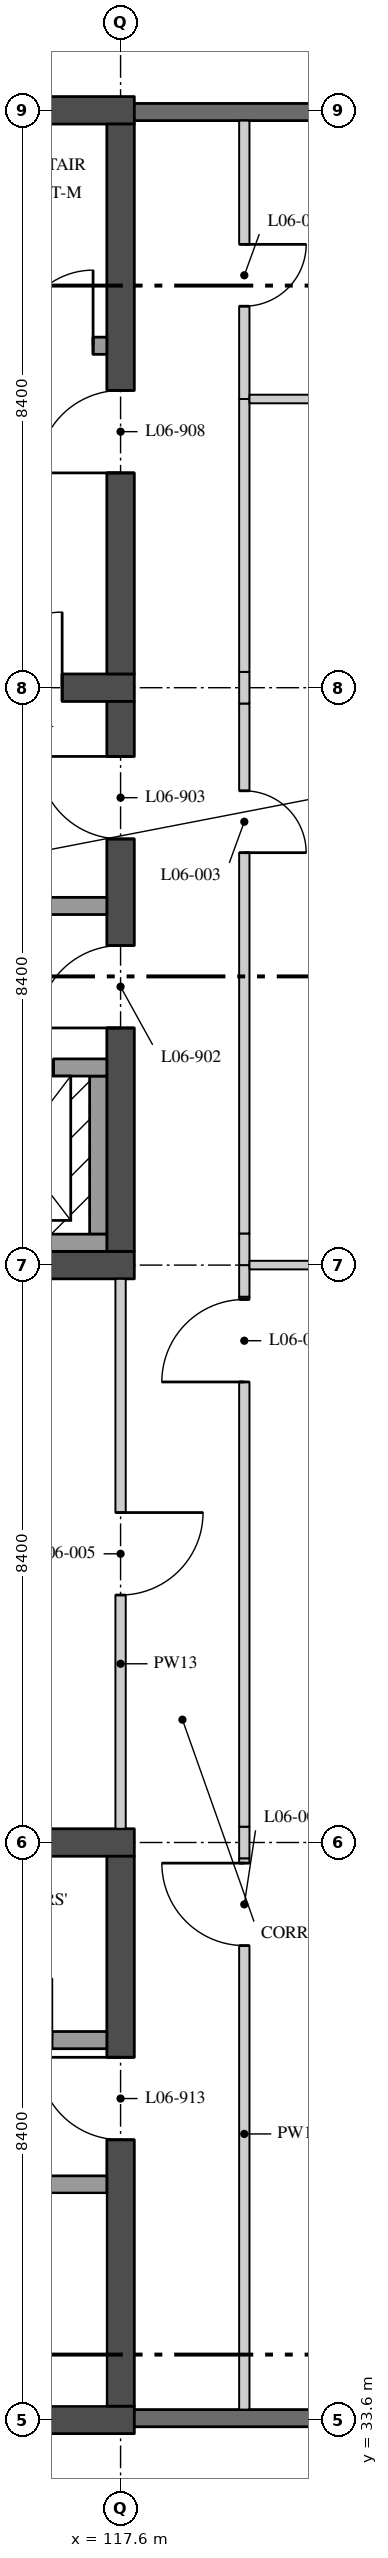
"""IFC4 building model, lengths in metres.
Left out: names, types, materials, properties, quantities, classifications, styles, units other than length and angle.
Written with IfcOpenShell. Run it as: python <this file> out.ifc"""

import sys

from ifc_helpers import new_model, si_unit, direction, frame, frame_2d, origin, place, context, subcontext, project, spatial, rectangle, extrude, element, fill, save


model = new_model("IFC4")
c1 = context("Model", 3, precision=1e-05, world=origin(), true_north=direction((0.0, 1.0)))
c2 = subcontext(c1, "Body", "Model", "MODEL_VIEW")
j1 = project(units=[si_unit("LENGTHUNIT", "METRE"), si_unit("PLANEANGLEUNIT", "RADIAN")], contexts=[c1])
p1 = place(None, origin())
s1 = spatial("IfcSite", under=j1, at=p1, CompositionType="ELEMENT")
p2 = place(p1, origin())
s2 = spatial("IfcBuilding", under=s1, at=p2, CompositionType="ELEMENT")
p3 = place(p2, frame((0.0, 0.0, 27.9)))
s3 = spatial("IfcBuildingStorey", under=s2, at=p3, CompositionType="ELEMENT", Elevation=27.9)
p4 = place(p3, frame((109.0, 50.4, 0.0), z_axis=(0.0, 0.0, 1.0), x_axis=(1.0, 0.0, 0.0)))
e1 = element("IfcWall", 1, at=p4, inside=s3, PredefinedType="SHEAR", context=c2, shape_type="SweptSolid", body=[
    extrude(rectangle(XDim=8.8, YDim=0.4, at=frame_2d((4.4, 0.0))), origin(), (0.0, 0.0, 1.0), 4.37),
])
p5 = place(p3, frame((109.0, 58.8, 0.0), z_axis=(0.0, 0.0, 1.0), x_axis=(1.0, 0.0, 0.0)))
e2 = element("IfcWall", 2, at=p5, inside=s3, PredefinedType="SHEAR", context=c2, shape_type="SweptSolid", body=[
    extrude(rectangle(XDim=8.8, YDim=0.4, at=frame_2d((4.4, 0.0))), origin(), (0.0, 0.0, 1.0), 4.37),
])
p6 = place(p5, frame((6.65, 0.0, 0.0)))
e3 = element("IfcOpeningElement", 3, at=p6, cuts=e2, PredefinedType="OPENING", context=c2, shape_type="SweptSolid", body=[
    extrude(rectangle(XDim=1.1, YDim=2.1, at=frame_2d((0.55, 1.05))), frame((0.0, 0.21, 0.0), z_axis=(0.0, -1.0, 0.0), x_axis=(1.0, 0.0, 0.0)), (0.0, 0.0, 1.0), 0.42),
])
p7 = place(p3, frame((117.6, 50.6, 0.0), z_axis=(0.0, 0.0, 1.0), x_axis=(0.0, 1.0, 0.0)))
e4 = element("IfcWall", 4, at=p7, inside=s3, PredefinedType="SHEAR", context=c2, shape_type="SweptSolid", body=[
    extrude(rectangle(XDim=8.0, YDim=0.4, at=frame_2d((4.0, 0.0))), origin(), (0.0, 0.0, 1.0), 4.37),
])
p8 = place(p7, frame((3.25, 0.0, 0.0)))
e5 = element("IfcOpeningElement", 5, at=p8, cuts=e4, PredefinedType="OPENING", context=c2, shape_type="SweptSolid", body=[
    extrude(rectangle(XDim=1.2, YDim=2.1, at=frame_2d((0.6, 1.05))), frame((0.0, 0.21, 0.0), z_axis=(0.0, -1.0, 0.0), x_axis=(1.0, 0.0, 0.0)), (0.0, 0.0, 1.0), 0.42),
])
p9 = place(p7, frame((6.0, 0.0, 0.0)))
e6 = element("IfcOpeningElement", 6, at=p9, cuts=e4, PredefinedType="OPENING", context=c2, shape_type="SweptSolid", body=[
    extrude(rectangle(XDim=1.2, YDim=2.1, at=frame_2d((0.6, 1.05))), frame((0.0, 0.21, 0.0), z_axis=(0.0, -1.0, 0.0), x_axis=(1.0, 0.0, 0.0)), (0.0, 0.0, 1.0), 0.42),
])
p10 = place(p3, frame((114.75, 55.625, 0.0), z_axis=(0.0, 0.0, 1.0), x_axis=(1.0, 0.0, 0.0)))
e7 = element("IfcWall", 7, at=p10, inside=s3, PredefinedType="SOLIDWALL", context=c2, shape_type="SweptSolid", body=[
    extrude(rectangle(XDim=2.65, YDim=0.25, at=frame_2d((1.325, 0.0))), origin(), (0.0, 0.0, 1.0), 4.37),
])
p11 = place(p3, frame((109.0, 67.2, 0.0), z_axis=(0.0, 0.0, 1.0), x_axis=(1.0, 0.0, 0.0)))
e8 = element("IfcWall", 8, at=p11, inside=s3, PredefinedType="SHEAR", context=c2, shape_type="SweptSolid", body=[
    extrude(rectangle(XDim=8.8, YDim=0.4, at=frame_2d((4.4, 0.0))), origin(), (0.0, 0.0, 1.0), 4.37),
])
p12 = place(p3, frame((117.6, 59.0, 0.0), z_axis=(0.0, 0.0, 1.0), x_axis=(0.0, 1.0, 0.0)))
e9 = element("IfcWall", 9, at=p12, inside=s3, PredefinedType="SHEAR", context=c2, shape_type="SweptSolid", body=[
    extrude(rectangle(XDim=8.0, YDim=0.4, at=frame_2d((4.0, 0.0))), origin(), (0.0, 0.0, 1.0), 4.37),
])
p13 = place(p12, frame((2.925, 0.0, 0.0)))
e10 = element("IfcOpeningElement", 10, at=p13, cuts=e9, PredefinedType="OPENING", context=c2, shape_type="SweptSolid", body=[
    extrude(rectangle(XDim=1.2, YDim=2.1, at=frame_2d((0.6, 1.05))), frame((0.0, 0.21, 0.0), z_axis=(0.0, -1.0, 0.0), x_axis=(1.0, 0.0, 0.0)), (0.0, 0.0, 1.0), 0.42),
])
p14 = place(p3, frame((117.4, 63.775, 0.0), z_axis=(0.0, 0.0, 1.0), x_axis=(-1.0, 0.0, 0.0)))
e11 = element("IfcWall", 11, at=p14, inside=s3, PredefinedType="SOLIDWALL", context=c2, shape_type="SweptSolid", body=[
    extrude(rectangle(XDim=8.0, YDim=0.25, at=frame_2d((4.0, 0.0))), origin(), (0.0, 0.0, 1.0), 4.37),
])
p15 = place(p14, frame((0.2, 0.0, 0.0)))
e12 = element("IfcOpeningElement", 12, at=p15, cuts=e11, PredefinedType="OPENING", context=c2, shape_type="SweptSolid", body=[
    extrude(rectangle(XDim=1.1, YDim=2.1, at=frame_2d((0.55, 1.05))), frame((0.0, 0.135, 0.0), z_axis=(0.0, -1.0, 0.0), x_axis=(1.0, 0.0, 0.0)), (0.0, 0.0, 1.0), 0.27),
])
for number, where, z_axis, x_axis in (
    (13, (109.0, 33.6, 0.0), (0.0, 0.0, 1.0), (1.0, 0.0, 0.0)),
    (14, (109.0, 42.0, 0.0), (0.0, 0.0, 1.0), (1.0, 0.0, 0.0)),
):
    element("IfcWall", number, at=place(p3, frame(where, z_axis=z_axis, x_axis=x_axis)), inside=s3, PredefinedType="SHEAR", context=c2, shape_type="SweptSolid", body=[
        extrude(rectangle(XDim=8.8, YDim=0.4, at=frame_2d((4.4, 0.0))), origin(), (0.0, 0.0, 1.0), 4.37),
    ])
p16 = place(p3, frame((117.6, 33.8, 0.0), z_axis=(0.0, 0.0, 1.0), x_axis=(0.0, 1.0, 0.0)))
e15 = element("IfcWall", 15, at=p16, inside=s3, PredefinedType="SHEAR", context=c2, shape_type="SweptSolid", body=[
    extrude(rectangle(XDim=8.0, YDim=0.4, at=frame_2d((4.0, 0.0))), origin(), (0.0, 0.0, 1.0), 4.37),
])
p17 = place(p16, frame((3.875, 0.0, 0.0)))
e16 = element("IfcOpeningElement", 16, at=p17, cuts=e15, PredefinedType="OPENING", context=c2, shape_type="SweptSolid", body=[
    extrude(rectangle(XDim=1.2, YDim=2.1, at=frame_2d((0.6, 1.05))), frame((0.0, 0.21, 0.0), z_axis=(0.0, -1.0, 0.0), x_axis=(1.0, 0.0, 0.0)), (0.0, 0.0, 1.0), 0.42),
])
p18 = place(p3, frame((109.4, 37.025, 0.0), z_axis=(0.0, 0.0, 1.0), x_axis=(1.0, 0.0, 0.0)))
e17 = element("IfcWall", 17, at=p18, inside=s3, PredefinedType="SOLIDWALL", context=c2, shape_type="SweptSolid", body=[
    extrude(rectangle(XDim=8.0, YDim=0.25, at=frame_2d((4.0, 0.0))), origin(), (0.0, 0.0, 1.0), 4.37),
])
p19 = place(p18, frame((0.2, 0.0, 0.0)))
e18 = element("IfcOpeningElement", 18, at=p19, cuts=e17, PredefinedType="OPENING", context=c2, shape_type="SweptSolid", body=[
    extrude(rectangle(XDim=1.1, YDim=2.1, at=frame_2d((0.55, 1.05))), frame((0.0, 0.135, 0.0), z_axis=(0.0, -1.0, 0.0), x_axis=(1.0, 0.0, 0.0)), (0.0, 0.0, 1.0), 0.27),
])
p20 = place(p3, frame((112.05, 39.125, 0.0), z_axis=(0.0, 0.0, 1.0), x_axis=(1.0, 0.0, 0.0)))
e19 = element("IfcWall", 19, at=p20, inside=s3, PredefinedType="SOLIDWALL", context=c2, shape_type="SweptSolid", body=[
    extrude(rectangle(XDim=5.35, YDim=0.25, at=frame_2d((2.675, 0.0))), origin(), (0.0, 0.0, 1.0), 4.37),
])
p21 = place(p20, frame((3.65, 0.0, 0.0)))
e20 = element("IfcOpeningElement", 20, at=p21, cuts=e19, PredefinedType="OPENING", context=c2, shape_type="SweptSolid", body=[
    extrude(rectangle(XDim=0.9, YDim=2.1, at=frame_2d((0.45, 1.05))), frame((0.0, 0.135, 0.0), z_axis=(0.0, -1.0, 0.0), x_axis=(1.0, 0.0, 0.0)), (0.0, 0.0, 1.0), 0.27),
])
p22 = place(p20, frame((0.9, 0.0, 0.0)))
e21 = element("IfcOpeningElement", 21, at=p22, cuts=e19, PredefinedType="OPENING", context=c2, shape_type="SweptSolid", body=[
    extrude(rectangle(XDim=0.8, YDim=2.1, at=frame_2d((0.4, 1.05))), frame((0.0, 0.135, 0.0), z_axis=(0.0, -1.0, 0.0), x_axis=(1.0, 0.0, 0.0)), (0.0, 0.0, 1.0), 0.27),
])
p23 = place(p3, frame((117.275, 50.85, 0.0), z_axis=(0.0, 0.0, 1.0), x_axis=(0.0, 1.0, 0.0)))
e22 = element("IfcWall", 22, at=p23, inside=s3, PredefinedType="SOLIDWALL", context=c2, shape_type="SweptSolid", body=[
    extrude(rectangle(XDim=2.3, YDim=0.25, at=frame_2d((1.15, 0.0))), origin(), (0.0, 0.0, 1.0), 4.37),
])
p24 = place(p3, frame((114.75, 53.275, 0.0), z_axis=(0.0, 0.0, 1.0), x_axis=(1.0, 0.0, 0.0)))
e23 = element("IfcWall", 23, at=p24, inside=s3, PredefinedType="SOLIDWALL", context=c2, shape_type="SweptSolid", body=[
    extrude(rectangle(XDim=2.65, YDim=0.25, at=frame_2d((1.325, 0.0))), origin(), (0.0, 0.0, 1.0), 4.37),
])
p25 = place(p24, frame((0.775, 0.0, 0.0)))
e24 = element("IfcOpeningElement", 24, at=p25, cuts=e23, PredefinedType="OPENING", context=c2, shape_type="SweptSolid", body=[
    extrude(rectangle(XDim=1.1, YDim=2.1, at=frame_2d((0.55, 1.05))), frame((0.0, 0.135, 0.0), z_axis=(0.0, -1.0, 0.0), x_axis=(1.0, 0.0, 0.0)), (0.0, 0.0, 1.0), 0.27),
])
p26 = place(p3, frame((114.75, 50.725, 0.0), z_axis=(0.0, 0.0, 1.0), x_axis=(1.0, 0.0, 0.0)))
e25 = element("IfcWall", 25, at=p26, inside=s3, PredefinedType="SOLIDWALL", context=c2, shape_type="SweptSolid", body=[
    extrude(rectangle(XDim=2.65, YDim=0.25, at=frame_2d((1.325, 0.0))), origin(), (0.0, 0.0, 1.0), 4.37),
])
p27 = place(p3, frame((119.4, 33.75, 0.0), z_axis=(0.0, 0.0, 1.0), x_axis=(0.0, 1.0, 0.0)))
e26 = element("IfcWall", 26, at=p27, inside=s3, PredefinedType="PARTITIONING", context=c2, shape_type="SweptSolid", body=[
    extrude(rectangle(XDim=8.02, YDim=0.15, at=frame_2d((4.01, 0.0))), origin(), (0.0, 0.0, 1.0), 4.37),
])
p28 = place(p27, frame((6.75, 0.0, 0.0)))
e27 = element("IfcOpeningElement", 27, at=p28, cuts=e26, PredefinedType="OPENING", context=c2, shape_type="SweptSolid", body=[
    extrude(rectangle(XDim=1.2, YDim=2.4, at=frame_2d((0.6, 1.2))), frame((0.0, 0.085, 0.0), z_axis=(0.0, -1.0, 0.0), x_axis=(1.0, 0.0, 0.0)), (0.0, 0.0, 1.0), 0.17),
])
p29 = place(p3, frame((119.4, 41.77, 0.0), z_axis=(0.0, 0.0, 1.0), x_axis=(0.0, 1.0, 0.0)))
e28 = element("IfcWall", 28, at=p29, inside=s3, PredefinedType="PARTITIONING", context=c2, shape_type="SweptSolid", body=[
    extrude(rectangle(XDim=0.46, YDim=0.15, at=frame_2d((0.23, 0.0))), origin(), (0.0, 0.0, 1.0), 3.746),
])
p30 = place(p3, frame((119.4, 42.23, 0.0), z_axis=(0.0, 0.0, 1.0), x_axis=(0.0, 1.0, 0.0)))
e29 = element("IfcWall", 29, at=p30, inside=s3, PredefinedType="PARTITIONING", context=c2, shape_type="SweptSolid", body=[
    extrude(rectangle(XDim=7.71, YDim=0.15, at=frame_2d((3.855, 0.0))), origin(), (0.0, 0.0, 1.0), 4.37),
])
p31 = place(p30, frame((6.47, 0.0, 0.0)))
e30 = element("IfcOpeningElement", 30, at=p31, cuts=e29, PredefinedType="OPENING", context=c2, shape_type="SweptSolid", body=[
    extrude(rectangle(XDim=1.2, YDim=2.4, at=frame_2d((0.6, 1.2))), frame((0.0, 0.085, 0.0), z_axis=(0.0, -1.0, 0.0), x_axis=(1.0, 0.0, 0.0)), (0.0, 0.0, 1.0), 0.17),
])
p32 = place(p3, frame((119.4, 49.94, 0.0), z_axis=(0.0, 0.0, 1.0), x_axis=(0.0, 1.0, 0.0)))
e31 = element("IfcWall", 31, at=p32, inside=s3, PredefinedType="PARTITIONING", context=c2, shape_type="SweptSolid", body=[
    extrude(rectangle(XDim=0.46, YDim=0.15, at=frame_2d((0.23, 0.0))), origin(), (0.0, 0.0, 1.0), 3.746),
])
p33 = place(p3, frame((119.4, 50.4, 0.0), z_axis=(0.0, 0.0, 1.0), x_axis=(0.0, 1.0, 0.0)))
e32 = element("IfcWall", 32, at=p33, inside=s3, PredefinedType="PARTITIONING", context=c2, shape_type="SweptSolid", body=[
    extrude(rectangle(XDim=0.46, YDim=0.15, at=frame_2d((0.23, 0.0))), origin(), (0.0, 0.0, 1.0), 3.746),
])
p34 = place(p3, frame((119.4, 50.86, 0.0), z_axis=(0.0, 0.0, 1.0), x_axis=(0.0, 1.0, 0.0)))
e33 = element("IfcWall", 33, at=p34, inside=s3, PredefinedType="PARTITIONING", context=c2, shape_type="SweptSolid", body=[
    extrude(rectangle(XDim=7.71, YDim=0.15, at=frame_2d((3.855, 0.0))), origin(), (0.0, 0.0, 1.0), 4.37),
])
p35 = place(p34, frame((5.54, 0.0, 0.0)))
e34 = element("IfcOpeningElement", 34, at=p35, cuts=e33, PredefinedType="OPENING", context=c2, shape_type="SweptSolid", body=[
    extrude(rectangle(XDim=0.9, YDim=2.1, at=frame_2d((0.45, 1.05))), frame((0.0, 0.085, 0.0), z_axis=(0.0, -1.0, 0.0), x_axis=(1.0, 0.0, 0.0)), (0.0, 0.0, 1.0), 0.17),
])
p36 = place(p3, frame((119.4, 58.57, 0.0), z_axis=(0.0, 0.0, 1.0), x_axis=(0.0, 1.0, 0.0)))
e35 = element("IfcWall", 35, at=p36, inside=s3, PredefinedType="PARTITIONING", context=c2, shape_type="SweptSolid", body=[
    extrude(rectangle(XDim=0.46, YDim=0.15, at=frame_2d((0.23, 0.0))), origin(), (0.0, 0.0, 1.0), 3.746),
])
p37 = place(p3, frame((119.4, 59.03, 0.0), z_axis=(0.0, 0.0, 1.0), x_axis=(0.0, 1.0, 0.0)))
e36 = element("IfcWall", 36, at=p37, inside=s3, PredefinedType="PARTITIONING", context=c2, shape_type="SweptSolid", body=[
    extrude(rectangle(XDim=3.97, YDim=0.15, at=frame_2d((1.985, 0.0))), origin(), (0.0, 0.0, 1.0), 4.37),
])
p38 = place(p3, frame((119.4, 63.0, 0.0), z_axis=(0.0, 0.0, 1.0), x_axis=(0.0, 1.0, 0.0)))
e37 = element("IfcWall", 37, at=p38, inside=s3, PredefinedType="PARTITIONING", context=c2, shape_type="SweptSolid", body=[
    extrude(rectangle(XDim=4.05, YDim=0.15, at=frame_2d((2.025, 0.0))), origin(), (0.0, 0.0, 1.0), 4.37),
])
p39 = place(p38, frame((1.35, 0.0, 0.0)))
e38 = element("IfcOpeningElement", 38, at=p39, cuts=e37, PredefinedType="OPENING", context=c2, shape_type="SweptSolid", body=[
    extrude(rectangle(XDim=0.9, YDim=2.1, at=frame_2d((0.45, 1.05))), frame((0.0, 0.085, 0.0), z_axis=(0.0, -1.0, 0.0), x_axis=(1.0, 0.0, 0.0)), (0.0, 0.0, 1.0), 0.17),
])
p40 = place(p3, frame((117.6, 42.2, 0.0), z_axis=(0.0, 0.0, 1.0), x_axis=(0.0, 1.0, 0.0)))
e39 = element("IfcWall", 39, at=p40, inside=s3, PredefinedType="PARTITIONING", context=c2, shape_type="SweptSolid", body=[
    extrude(rectangle(XDim=8.0, YDim=0.15, at=frame_2d((4.0, 0.0))), origin(), (0.0, 0.0, 1.0), 3.746),
])
p41 = place(p40, frame((3.4, 0.0, 0.0)))
e40 = element("IfcOpeningElement", 40, at=p41, cuts=e39, PredefinedType="OPENING", context=c2, shape_type="SweptSolid", body=[
    extrude(rectangle(XDim=1.2, YDim=2.4, at=frame_2d((0.6, 1.2))), frame((0.0, 0.085, 0.0), z_axis=(0.0, -1.0, 0.0), x_axis=(1.0, 0.0, 0.0)), (0.0, 0.0, 1.0), 0.17),
])
p42 = place(p3, frame((119.475, 50.4, 0.0), z_axis=(0.0, 0.0, 1.0), x_axis=(1.0, 0.0, 0.0)))
e41 = element("IfcWall", 41, at=p42, inside=s3, PredefinedType="PARTITIONING", context=c2, shape_type="SweptSolid", body=[
    extrude(rectangle(XDim=6.339, YDim=0.125, at=frame_2d((3.169, 0.0))), origin(), (0.0, 0.0, 1.0), 3.746),
])
p43 = place(p3, frame((119.475, 63.0, 0.0), z_axis=(0.0, 0.0, 1.0), x_axis=(1.0, 0.0, 0.0)))
e42 = element("IfcWall", 42, at=p43, inside=s3, PredefinedType="PARTITIONING", context=c2, shape_type="SweptSolid", body=[
    extrude(rectangle(XDim=1.118, YDim=0.125, at=frame_2d((0.559, 0.0))), origin(), (0.0, 0.0, 1.0), 3.895),
])
p44 = place(p3, frame((125.996, 67.175, 0.0), z_axis=(0.0, 0.0, 1.0), x_axis=(-1.0, 0.0, 0.0)))
e43 = element("IfcWall", 43, at=p44, inside=s3, PredefinedType="SOLIDWALL", context=c2, shape_type="SweptSolid", body=[
    extrude(rectangle(XDim=8.196, YDim=0.25, at=frame_2d((4.098, 0.0))), origin(), (0.0, 0.0, 1.0), 3.746),
])
p45 = place(p3, frame((117.8, 33.625, 0.0), z_axis=(0.0, 0.0, 1.0), x_axis=(1.0, 0.0, 0.0)))
e44 = element("IfcWall", 44, at=p45, inside=s3, PredefinedType="SOLIDWALL", context=c2, shape_type="SweptSolid", body=[
    extrude(rectangle(XDim=8.199, YDim=0.25, at=frame_2d((4.1, 0.0))), origin(), (0.0, 0.0, 1.0), 3.746),
])
p46 = place(p45, frame((5.2, 0.0, 0.9)))
e45 = element("IfcOpeningElement", 45, at=p46, cuts=e44, PredefinedType="OPENING", context=c2, shape_type="SweptSolid", body=[
    extrude(rectangle(XDim=1.8, YDim=1.95, at=frame_2d((0.9, 0.975))), frame((0.0, 0.135, 0.0), z_axis=(0.0, -1.0, 0.0), x_axis=(1.0, 0.0, 0.0)), (0.0, 0.0, 1.0), 0.27),
])
p47 = place(p8, origin())
e46 = element("IfcDoor", 46, at=p47, inside=s3, OperationType="SINGLE_SWING_RIGHT", PredefinedType="DOOR", context=c2, shape_type="SweptSolid", body=[
    extrude(rectangle(XDim=1.2, YDim=2.1, at=frame_2d((0.6, 1.05))), frame((0.0, 0.035, 0.0), z_axis=(0.0, -1.0, 0.0), x_axis=(1.0, 0.0, 0.0)), (0.0, 0.0, 1.0), 0.07),
])
fill(e5, e46)
p48 = place(p9, origin())
e47 = element("IfcDoor", 47, at=p48, inside=s3, OperationType="SINGLE_SWING_LEFT", PredefinedType="DOOR", context=c2, shape_type="SweptSolid", body=[
    extrude(rectangle(XDim=1.2, YDim=2.1, at=frame_2d((0.6, 1.05))), frame((0.0, 0.035, 0.0), z_axis=(0.0, -1.0, 0.0), x_axis=(1.0, 0.0, 0.0)), (0.0, 0.0, 1.0), 0.07),
])
fill(e6, e47)
p49 = place(p6, origin())
e48 = element("IfcDoor", 48, at=p49, inside=s3, OperationType="SINGLE_SWING_LEFT", PredefinedType="DOOR", context=c2, shape_type="SweptSolid", body=[
    extrude(rectangle(XDim=1.1, YDim=2.1, at=frame_2d((0.55, 1.05))), frame((0.0, 0.035, 0.0), z_axis=(0.0, -1.0, 0.0), x_axis=(1.0, 0.0, 0.0)), (0.0, 0.0, 1.0), 0.07),
])
fill(e3, e48)
p50 = place(p13, origin())
e49 = element("IfcDoor", 49, at=p50, inside=s3, OperationType="SINGLE_SWING_RIGHT", PredefinedType="DOOR", context=c2, shape_type="SweptSolid", body=[
    extrude(rectangle(XDim=1.2, YDim=2.1, at=frame_2d((0.6, 1.05))), frame((0.0, 0.035, 0.0), z_axis=(0.0, -1.0, 0.0), x_axis=(1.0, 0.0, 0.0)), (0.0, 0.0, 1.0), 0.07),
])
fill(e10, e49)
p51 = place(p15, frame((1.1, 0.0, 0.0), z_axis=(0.0, 0.0, 1.0), x_axis=(-1.0, 0.0, 0.0)))
e50 = element("IfcDoor", 50, at=p51, inside=s3, OperationType="SINGLE_SWING_LEFT", PredefinedType="DOOR", context=c2, shape_type="SweptSolid", body=[
    extrude(rectangle(XDim=1.1, YDim=2.1, at=frame_2d((0.55, 1.05))), frame((0.0, 0.035, 0.0), z_axis=(0.0, -1.0, 0.0), x_axis=(1.0, 0.0, 0.0)), (0.0, 0.0, 1.0), 0.07),
])
fill(e12, e50)
p52 = place(p17, origin())
e51 = element("IfcDoor", 51, at=p52, inside=s3, OperationType="SINGLE_SWING_LEFT", PredefinedType="DOOR", context=c2, shape_type="SweptSolid", body=[
    extrude(rectangle(XDim=1.2, YDim=2.1, at=frame_2d((0.6, 1.05))), frame((0.0, 0.035, 0.0), z_axis=(0.0, -1.0, 0.0), x_axis=(1.0, 0.0, 0.0)), (0.0, 0.0, 1.0), 0.07),
])
fill(e16, e51)
p53 = place(p25, origin())
e52 = element("IfcDoor", 52, at=p53, inside=s3, OperationType="DOUBLE_DOOR_SLIDING", PredefinedType="DOOR", context=c2, shape_type="SweptSolid", body=[
    extrude(rectangle(XDim=1.1, YDim=2.1, at=frame_2d((0.55, 1.05))), frame((0.0, 0.04, 0.0), z_axis=(0.0, -1.0, 0.0), x_axis=(1.0, 0.0, 0.0)), (0.0, 0.0, 1.0), 0.08),
])
fill(e24, e52)
p54 = place(p28, origin())
e53 = element("IfcDoor", 53, at=p54, inside=s3, OperationType="SINGLE_SWING_LEFT", PredefinedType="DOOR", context=c2, shape_type="SweptSolid", body=[
    extrude(rectangle(XDim=1.2, YDim=2.4, at=frame_2d((0.6, 1.2))), frame((0.0, 0.025, 0.0), z_axis=(0.0, -1.0, 0.0), x_axis=(1.0, 0.0, 0.0)), (0.0, 0.0, 1.0), 0.05),
])
fill(e27, e53)
p55 = place(p31, origin())
e54 = element("IfcDoor", 54, at=p55, inside=s3, OperationType="SINGLE_SWING_RIGHT", PredefinedType="DOOR", context=c2, shape_type="SweptSolid", body=[
    extrude(rectangle(XDim=1.2, YDim=2.4, at=frame_2d((0.6, 1.2))), frame((0.0, 0.025, 0.0), z_axis=(0.0, -1.0, 0.0), x_axis=(1.0, 0.0, 0.0)), (0.0, 0.0, 1.0), 0.05),
])
fill(e30, e54)
p56 = place(p35, frame((0.9, 0.0, 0.0), z_axis=(0.0, 0.0, 1.0), x_axis=(-1.0, 0.0, 0.0)))
e55 = element("IfcDoor", 55, at=p56, inside=s3, OperationType="SINGLE_SWING_LEFT", PredefinedType="DOOR", context=c2, shape_type="SweptSolid", body=[
    extrude(rectangle(XDim=0.9, YDim=2.1, at=frame_2d((0.45, 1.05))), frame((0.0, 0.025, 0.0), z_axis=(0.0, -1.0, 0.0), x_axis=(1.0, 0.0, 0.0)), (0.0, 0.0, 1.0), 0.05),
])
fill(e34, e55)
p57 = place(p39, frame((0.9, 0.0, 0.0), z_axis=(0.0, 0.0, 1.0), x_axis=(-1.0, 0.0, 0.0)))
e56 = element("IfcDoor", 56, at=p57, inside=s3, OperationType="SINGLE_SWING_RIGHT", PredefinedType="DOOR", context=c2, shape_type="SweptSolid", body=[
    extrude(rectangle(XDim=0.9, YDim=2.1, at=frame_2d((0.45, 1.05))), frame((0.0, 0.025, 0.0), z_axis=(0.0, -1.0, 0.0), x_axis=(1.0, 0.0, 0.0)), (0.0, 0.0, 1.0), 0.05),
])
fill(e38, e56)
p58 = place(p41, frame((1.2, 0.0, 0.0), z_axis=(0.0, 0.0, 1.0), x_axis=(-1.0, 0.0, 0.0)))
e57 = element("IfcDoor", 57, at=p58, inside=s3, OperationType="SINGLE_SWING_RIGHT", PredefinedType="DOOR", context=c2, shape_type="SweptSolid", body=[
    extrude(rectangle(XDim=1.2, YDim=2.4, at=frame_2d((0.6, 1.2))), frame((0.0, 0.025, 0.0), z_axis=(0.0, -1.0, 0.0), x_axis=(1.0, 0.0, 0.0)), (0.0, 0.0, 1.0), 0.05),
])
fill(e40, e57)
save(model, sys.argv[1])
